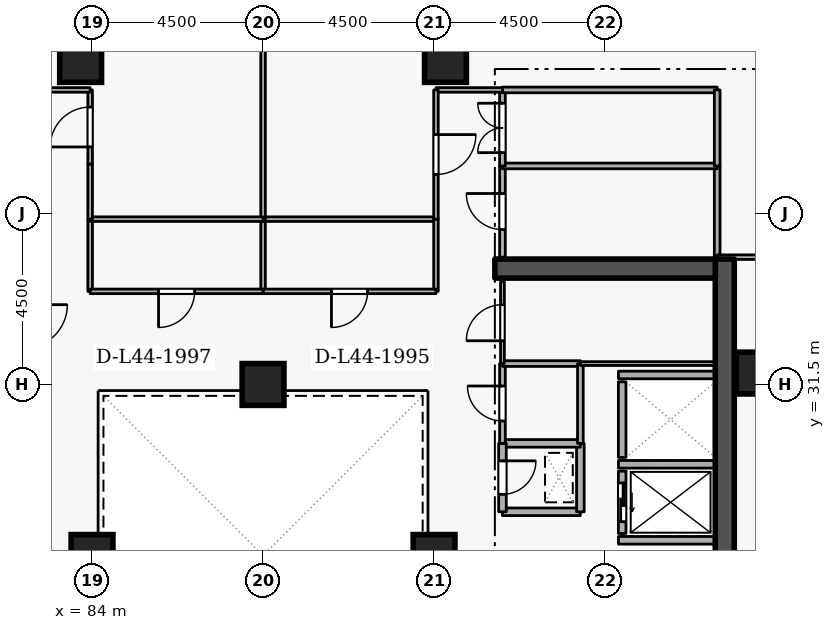
"""IFC4 building model, lengths in metres.
Left out: names, types, materials, properties, quantities, classifications, styles, units other than length and angle.
Written with IfcOpenShell. Run it as: python <this file> out.ifc"""

import sys

from ifc_helpers import new_model, si_unit, direction, frame, frame_2d, origin, origin_2d, place, context, subcontext, project, spatial, rectangle, extrude, element, fill, save


model = new_model("IFC4")
c1 = context("Model", 3, precision=1e-05, world=origin(), true_north=direction((0.0, 1.0)))
c2 = subcontext(c1, "Body", "Model", "MODEL_VIEW")
j1 = project(units=[si_unit("LENGTHUNIT", "METRE"), si_unit("PLANEANGLEUNIT", "RADIAN")], contexts=[c1])
p1 = place(None, origin())
s1 = spatial("IfcSite", under=j1, at=p1, CompositionType="ELEMENT")
p2 = place(p1, origin())
s2 = spatial("IfcBuilding", under=s1, at=p2, CompositionType="ELEMENT")
p3 = place(p2, frame((0.0, 0.0, 167.1)))
s3 = spatial("IfcBuildingStorey", under=s2, at=p3, CompositionType="ELEMENT", Elevation=167.1)
p4 = place(p3, frame((100.65, 19.2, 0.0), z_axis=(0.0, 0.0, 1.0), x_axis=(0.0, 1.0, 0.0)))
e1 = element("IfcWall", 1, at=p4, inside=s3, PredefinedType="SHEAR", context=c2, shape_type="SweptSolid", body=[
    extrude(rectangle(XDim=15.6, YDim=0.5, at=frame_2d((7.8, 0.0))), origin(), (0.0, 0.0, 1.0), 3.6),
])
p5 = place(p3, frame((94.6, 34.55, 0.0), z_axis=(0.0, 0.0, 1.0), x_axis=(1.0, 0.0, 0.0)))
e2 = element("IfcWall", 2, at=p5, inside=s3, PredefinedType="SHEAR", context=c2, shape_type="SweptSolid", body=[
    extrude(rectangle(XDim=5.8, YDim=0.5, at=frame_2d((2.9, 0.0))), origin(), (0.0, 0.0, 1.0), 3.6),
])
for number, where, z_axis, x_axis in (
    (3, (93.3, 40.0, 0.0), (0.0, 0.0, 1.0), (1.0, 0.0, 0.0)),
    (4, (83.7, 40.0, 0.0), (0.0, 0.0, 1.0), (1.0, 0.0, 0.0)),
    (5, (101.5, 31.8, 0.0), (0.0, 0.0, 1.0), (1.0, 0.0, 0.0)),
    (6, (93.0, 27.0, 0.0), (0.0, 0.0, 1.0), (1.0, 0.0, 0.0)),
    (7, (84.0, 27.0, 0.0), (0.0, 0.0, 1.0), (1.0, 0.0, 0.0)),
    (8, (88.5, 31.5, 0.0), (0.0, 0.0, 1.0), (1.0, 0.0, 0.0)),
):
    element("IfcColumn", number, at=place(p3, frame(where, z_axis=z_axis, x_axis=x_axis)), inside=s3, PredefinedType="COLUMN", context=c2, shape_type="SweptSolid", body=[
        extrude(rectangle(XDim=1.1, YDim=1.1, at=origin_2d()), origin(), (0.0, 0.0, 1.0), 3.6),
    ])
p6 = place(p3, frame((97.95, 29.22, 0.0), z_axis=(0.0, 0.0, 1.0), x_axis=(0.0, -1.0, 0.0)))
e9 = element("IfcWall", 9, at=p6, inside=s3, PredefinedType="STANDARD", context=c2, shape_type="SweptSolid", body=[
    extrude(rectangle(XDim=1.64, YDim=0.2, at=frame_2d((0.82, 0.0))), origin(), (0.0, 0.0, 1.0), 3.34),
])
p7 = place(p6, frame((0.31, 0.0, 0.0)))
e10 = element("IfcOpeningElement", 10, at=p7, cuts=e9, PredefinedType="OPENING", context=c2, shape_type="SweptSolid", body=[
    extrude(rectangle(XDim=1.02, YDim=2.06, at=frame_2d((0.51, 1.03))), frame((0.0, 0.11, 0.0), z_axis=(0.0, -1.0, 0.0), x_axis=(1.0, 0.0, 0.0)), (0.0, 0.0, 1.0), 0.22),
])
p8 = place(p3, frame((97.95, 31.57, 0.0), z_axis=(0.0, 0.0, 1.0), x_axis=(0.0, -1.0, 0.0)))
e11 = element("IfcWall", 11, at=p8, inside=s3, PredefinedType="STANDARD", context=c2, shape_type="SweptSolid", body=[
    extrude(rectangle(XDim=1.99, YDim=0.2, at=frame_2d((0.995, 0.0))), origin(), (0.0, 0.0, 1.0), 3.34),
])
for number, where, z_axis, x_axis in (
    (12, (97.852, 29.4, 0.0), (0.0, 0.0, 1.0), (1.0, 0.0, 0.0)),
    (13, (97.852, 27.4, 0.0), (0.0, 0.0, 1.0), (1.0, 0.0, 0.0)),
    (14, (97.852, 31.75, 0.0), (0.0, 0.0, 1.0), (1.0, 0.0, 0.0)),
):
    element("IfcWall", number, at=place(p3, frame(where, z_axis=z_axis, x_axis=x_axis)), inside=s3, PredefinedType="STANDARD", context=c2, shape_type="SweptSolid", body=[
        extrude(rectangle(XDim=2.536, YDim=0.2, at=frame_2d((1.268, 0.0))), origin(), (0.0, 0.0, 1.0), 3.34),
    ])
p9 = place(p3, frame((94.8, 28.15, 0.0), z_axis=(0.0, 0.0, 1.0), x_axis=(1.0, 0.0, 0.0)))
e15 = element("IfcWall", 15, at=p9, inside=s3, PredefinedType="STANDARD", context=c2, shape_type="SweptSolid", body=[
    extrude(rectangle(XDim=2.05, YDim=0.2, at=frame_2d((1.025, 0.0))), origin(), (0.0, 0.0, 1.0), 3.34),
])
p10 = place(p3, frame((96.85, 28.15, 0.0), z_axis=(0.0, 0.0, 1.0), x_axis=(0.0, 1.0, 0.0)))
e16 = element("IfcWall", 16, at=p10, inside=s3, PredefinedType="STANDARD", context=c2, shape_type="SweptSolid", body=[
    extrude(rectangle(XDim=1.8, YDim=0.2, at=frame_2d((0.9, 0.0))), origin(), (0.0, 0.0, 1.0), 3.34),
])
p11 = place(p3, frame((96.85, 29.95, 0.0), z_axis=(0.0, 0.0, 1.0), x_axis=(-1.0, 0.0, 0.0)))
e17 = element("IfcWall", 17, at=p11, inside=s3, PredefinedType="STANDARD", context=c2, shape_type="SweptSolid", body=[
    extrude(rectangle(XDim=2.05, YDim=0.2, at=frame_2d((1.025, 0.0))), origin(), (0.0, 0.0, 1.0), 3.34),
])
p12 = place(p3, frame((94.8, 29.95, 0.0), z_axis=(0.0, 0.0, 1.0), x_axis=(0.0, -1.0, 0.0)))
e18 = element("IfcWall", 18, at=p12, inside=s3, PredefinedType="STANDARD", context=c2, shape_type="SweptSolid", body=[
    extrude(rectangle(XDim=1.8, YDim=0.2, at=frame_2d((0.9, 0.0))), origin(), (0.0, 0.0, 1.0), 3.34),
])
p13 = place(p12, frame((0.46, 0.0, 0.0)))
e19 = element("IfcOpeningElement", 19, at=p13, cuts=e18, PredefinedType="OPENING", context=c2, shape_type="SweptSolid", body=[
    extrude(rectangle(XDim=0.88, YDim=2.04, at=frame_2d((0.44, 1.02))), frame((0.0, 0.11, 0.0), z_axis=(0.0, -1.0, 0.0), x_axis=(1.0, 0.0, 0.0)), (0.0, 0.0, 1.0), 0.22),
])
p14 = place(p3, frame((94.8, 29.95, 0.0), z_axis=(0.0, 0.0, 1.0), x_axis=(0.0, 1.0, 0.0)))
e20 = element("IfcWall", 20, at=p14, inside=s3, PredefinedType="PARTITIONING", context=c2, shape_type="SweptSolid", body=[
    extrude(rectangle(XDim=2.1, YDim=0.15, at=frame_2d((1.05, 0.0))), origin(), (0.0, 0.0, 1.0), 3.34),
])
p15 = place(p14, frame((0.59, 0.0, 0.0)))
e21 = element("IfcOpeningElement", 21, at=p15, cuts=e20, PredefinedType="OPENING", context=c2, shape_type="SweptSolid", body=[
    extrude(rectangle(XDim=0.92, YDim=2.08, at=frame_2d((0.46, 1.04))), frame((0.0, 0.085, 0.0), z_axis=(0.0, -1.0, 0.0), x_axis=(1.0, 0.0, 0.0)), (0.0, 0.0, 1.0), 0.17),
])
p16 = place(p3, frame((94.8, 32.05, 0.0), z_axis=(0.0, 0.0, 1.0), x_axis=(1.0, 0.0, 0.0)))
e22 = element("IfcWall", 22, at=p16, inside=s3, PredefinedType="PARTITIONING", context=c2, shape_type="SweptSolid", body=[
    extrude(rectangle(XDim=2.05, YDim=0.15, at=frame_2d((1.025, 0.0))), origin(), (0.0, 0.0, 1.0), 3.34),
])
p17 = place(p3, frame((96.85, 32.05, 0.0), z_axis=(0.0, 0.0, 1.0), x_axis=(0.0, -1.0, 0.0)))
e23 = element("IfcWall", 23, at=p17, inside=s3, PredefinedType="PARTITIONING", context=c2, shape_type="SweptSolid", body=[
    extrude(rectangle(XDim=2.1, YDim=0.15, at=frame_2d((1.05, 0.0))), origin(), (0.0, 0.0, 1.0), 3.34),
])
p18 = place(p3, frame((94.8, 32.05, 0.0), z_axis=(0.0, 0.0, 1.0), x_axis=(0.0, 1.0, 0.0)))
e24 = element("IfcWall", 24, at=p18, inside=s3, PredefinedType="PARTITIONING", context=c2, shape_type="SweptSolid", body=[
    extrude(rectangle(XDim=2.15, YDim=0.1, at=frame_2d((1.075, 0.0))), origin(), (0.0, 0.0, 1.0), 3.34),
])
p19 = place(p18, frame((0.6, 0.0, 0.0)))
e25 = element("IfcOpeningElement", 25, at=p19, cuts=e24, PredefinedType="OPENING", context=c2, shape_type="SweptSolid", body=[
    extrude(rectangle(XDim=0.95, YDim=2.1, at=frame_2d((0.475, 1.05))), frame((0.0, 0.06, 0.0), z_axis=(0.0, -1.0, 0.0), x_axis=(1.0, 0.0, 0.0)), (0.0, 0.0, 1.0), 0.12),
])
p20 = place(p3, frame((100.4, 32.05, 0.0), z_axis=(0.0, 0.0, 1.0), x_axis=(-1.0, 0.0, 0.0)))
e26 = element("IfcWall", 26, at=p20, inside=s3, PredefinedType="PARTITIONING", context=c2, shape_type="SweptSolid", body=[
    extrude(rectangle(XDim=3.55, YDim=0.1, at=frame_2d((1.775, 0.0))), origin(), (0.0, 0.0, 1.0), 3.34),
])
p21 = place(p3, frame((100.45, 37.25, 0.0), z_axis=(0.0, 0.0, 1.0), x_axis=(0.0, -1.0, 0.0)))
e27 = element("IfcWall", 27, at=p21, inside=s3, PredefinedType="PARTITIONING", context=c2, shape_type="SweptSolid", body=[
    extrude(rectangle(XDim=2.4, YDim=0.15, at=frame_2d((1.2, 0.0))), origin(), (0.0, 0.0, 1.0), 3.34),
])
p22 = place(p3, frame((94.8, 34.85, 0.0), z_axis=(0.0, 0.0, 1.0), x_axis=(0.0, 1.0, 0.0)))
e28 = element("IfcWall", 28, at=p22, inside=s3, PredefinedType="PARTITIONING", context=c2, shape_type="SweptSolid", body=[
    extrude(rectangle(XDim=2.4, YDim=0.15, at=frame_2d((1.2, 0.0))), origin(), (0.0, 0.0, 1.0), 3.34),
])
p23 = place(p22, frame((0.725, 0.0, 0.0)))
e29 = element("IfcOpeningElement", 29, at=p23, cuts=e28, PredefinedType="OPENING", context=c2, shape_type="SweptSolid", body=[
    extrude(rectangle(XDim=0.95, YDim=2.1, at=frame_2d((0.475, 1.05))), frame((0.0, 0.085, 0.0), z_axis=(0.0, -1.0, 0.0), x_axis=(1.0, 0.0, 0.0)), (0.0, 0.0, 1.0), 0.17),
])
p24 = place(p3, frame((94.8, 37.25, 0.0), z_axis=(0.0, 0.0, 1.0), x_axis=(1.0, 0.0, 0.0)))
e30 = element("IfcWall", 30, at=p24, inside=s3, PredefinedType="PARTITIONING", context=c2, shape_type="SweptSolid", body=[
    extrude(rectangle(XDim=5.65, YDim=0.15, at=frame_2d((2.825, 0.0))), origin(), (0.0, 0.0, 1.0), 3.34),
])
p25 = place(p3, frame((94.8, 37.25, 0.0), z_axis=(0.0, 0.0, 1.0), x_axis=(0.0, 1.0, 0.0)))
e31 = element("IfcWall", 31, at=p25, inside=s3, PredefinedType="PARTITIONING", context=c2, shape_type="SweptSolid", body=[
    extrude(rectangle(XDim=2.0, YDim=0.15, at=frame_2d((1.0, 0.0))), origin(), (0.0, 0.0, 1.0), 3.34),
])
p26 = place(p25, frame((0.35, 0.0, 0.0)))
e32 = element("IfcOpeningElement", 32, at=p26, cuts=e31, PredefinedType="OPENING", context=c2, shape_type="SweptSolid", body=[
    extrude(rectangle(XDim=1.3, YDim=2.12, at=frame_2d((0.65, 1.06))), frame((0.0, 0.085, 0.0), z_axis=(0.0, -1.0, 0.0), x_axis=(1.0, 0.0, 0.0)), (0.0, 0.0, 1.0), 0.17),
])
p27 = place(p3, frame((94.8, 39.25, 0.0), z_axis=(0.0, 0.0, 1.0), x_axis=(1.0, 0.0, 0.0)))
e33 = element("IfcWall", 33, at=p27, inside=s3, PredefinedType="PARTITIONING", context=c2, shape_type="SweptSolid", body=[
    extrude(rectangle(XDim=5.65, YDim=0.15, at=frame_2d((2.825, 0.0))), origin(), (0.0, 0.0, 1.0), 3.34),
])
p28 = place(p3, frame((100.45, 39.25, 0.0), z_axis=(0.0, 0.0, 1.0), x_axis=(0.0, -1.0, 0.0)))
e34 = element("IfcWall", 34, at=p28, inside=s3, PredefinedType="PARTITIONING", context=c2, shape_type="SweptSolid", body=[
    extrude(rectangle(XDim=2.0, YDim=0.15, at=frame_2d((1.0, 0.0))), origin(), (0.0, 0.0, 1.0), 3.34),
])
p29 = place(p3, frame((88.5, 33.95, 0.0), z_axis=(0.0, 0.0, 1.0), x_axis=(0.0, 1.0, 0.0)))
e35 = element("IfcWall", 35, at=p29, inside=s3, PredefinedType="PARTITIONING", context=c2, shape_type="SweptSolid", body=[
    extrude(rectangle(XDim=1.9, YDim=0.12, at=frame_2d((0.95, 0.0))), origin(), (0.0, 0.0, 1.0), 3.34),
])
p30 = place(p3, frame((88.5, 35.85, 0.0), z_axis=(0.0, 0.0, 1.0), x_axis=(1.0, 0.0, 0.0)))
e36 = element("IfcWall", 36, at=p30, inside=s3, PredefinedType="PARTITIONING", context=c2, shape_type="SweptSolid", body=[
    extrude(rectangle(XDim=4.55, YDim=0.12, at=frame_2d((2.275, 0.0))), origin(), (0.0, 0.0, 1.0), 3.34),
])
p31 = place(p3, frame((93.05, 35.85, 0.0), z_axis=(0.0, 0.0, 1.0), x_axis=(0.0, -1.0, 0.0)))
e37 = element("IfcWall", 37, at=p31, inside=s3, PredefinedType="PARTITIONING", context=c2, shape_type="SweptSolid", body=[
    extrude(rectangle(XDim=1.9, YDim=0.12, at=frame_2d((0.95, 0.0))), origin(), (0.0, 0.0, 1.0), 3.34),
])
p32 = place(p3, frame((93.05, 33.95, 0.0), z_axis=(0.0, 0.0, 1.0), x_axis=(-1.0, 0.0, 0.0)))
e38 = element("IfcWall", 38, at=p32, inside=s3, PredefinedType="PARTITIONING", context=c2, shape_type="SweptSolid", body=[
    extrude(rectangle(XDim=4.55, YDim=0.12, at=frame_2d((2.275, 0.0))), origin(), (0.0, 0.0, 1.0), 3.34),
])
p33 = place(p32, frame((1.8, 0.0, 0.0)))
e39 = element("IfcOpeningElement", 39, at=p33, cuts=e38, PredefinedType="OPENING", context=c2, shape_type="SweptSolid", body=[
    extrude(rectangle(XDim=0.95, YDim=2.1, at=frame_2d((0.475, 1.05))), frame((0.0, 0.07, 0.0), z_axis=(0.0, -1.0, 0.0), x_axis=(1.0, 0.0, 0.0)), (0.0, 0.0, 1.0), 0.14),
])
p34 = place(p3, frame((94.8, 39.25, 0.0), z_axis=(0.0, 0.0, 1.0), x_axis=(-1.0, 0.0, 0.0)))
e40 = element("IfcWall", 40, at=p34, inside=s3, PredefinedType="PARTITIONING", context=c2, shape_type="SweptSolid", body=[
    extrude(rectangle(XDim=1.75, YDim=0.12, at=frame_2d((0.875, 0.0))), origin(), (0.0, 0.0, 1.0), 3.34),
])
p35 = place(p3, frame((93.05, 39.25, 0.0), z_axis=(0.0, 0.0, 1.0), x_axis=(0.0, -1.0, 0.0)))
e41 = element("IfcWall", 41, at=p35, inside=s3, PredefinedType="PARTITIONING", context=c2, shape_type="SweptSolid", body=[
    extrude(rectangle(XDim=3.4, YDim=0.12, at=frame_2d((1.7, 0.0))), origin(), (0.0, 0.0, 1.0), 3.34),
])
p36 = place(p35, frame((1.175, 0.0, 0.0)))
e42 = element("IfcOpeningElement", 42, at=p36, cuts=e41, PredefinedType="OPENING", context=c2, shape_type="SweptSolid", body=[
    extrude(rectangle(XDim=1.05, YDim=2.1, at=frame_2d((0.525, 1.05))), frame((0.0, 0.07, 0.0), z_axis=(0.0, -1.0, 0.0), x_axis=(1.0, 0.0, 0.0)), (0.0, 0.0, 1.0), 0.14),
])
p37 = place(p3, frame((88.5, 35.85, 0.0), z_axis=(0.0, 0.0, 1.0), x_axis=(0.0, 1.0, 0.0)))
e43 = element("IfcWall", 43, at=p37, inside=s3, PredefinedType="PARTITIONING", context=c2, shape_type="SweptSolid", body=[
    extrude(rectangle(XDim=8.45, YDim=0.12, at=frame_2d((4.225, 0.0))), origin(), (0.0, 0.0, 1.0), 2.882),
])
p38 = place(p3, frame((112.22, 34.85, 0.0), z_axis=(0.0, 0.0, 1.0), x_axis=(-1.0, 0.0, 0.0)))
e44 = element("IfcWall", 44, at=p38, inside=s3, PredefinedType="PARTITIONING", context=c2, shape_type="SweptSolid", body=[
    extrude(rectangle(XDim=11.77, YDim=0.12, at=frame_2d((5.885, 0.0))), origin(), (0.0, 0.0, 1.0), 2.545),
])
p39 = place(p3, frame((83.95, 33.95, 0.0), z_axis=(0.0, 0.0, 1.0), x_axis=(0.0, 1.0, 0.0)))
e45 = element("IfcWall", 45, at=p39, inside=s3, PredefinedType="PARTITIONING", context=c2, shape_type="SweptSolid", body=[
    extrude(rectangle(XDim=1.9, YDim=0.12, at=frame_2d((0.95, 0.0))), origin(), (0.0, 0.0, 1.0), 3.34),
])
p40 = place(p3, frame((83.95, 35.85, 0.0), z_axis=(0.0, 0.0, 1.0), x_axis=(1.0, 0.0, 0.0)))
e46 = element("IfcWall", 46, at=p40, inside=s3, PredefinedType="PARTITIONING", context=c2, shape_type="SweptSolid", body=[
    extrude(rectangle(XDim=4.55, YDim=0.12, at=frame_2d((2.275, 0.0))), origin(), (0.0, 0.0, 1.0), 3.34),
])
p41 = place(p3, frame((88.5, 33.95, 0.0), z_axis=(0.0, 0.0, 1.0), x_axis=(-1.0, 0.0, 0.0)))
e47 = element("IfcWall", 47, at=p41, inside=s3, PredefinedType="PARTITIONING", context=c2, shape_type="SweptSolid", body=[
    extrude(rectangle(XDim=4.55, YDim=0.12, at=frame_2d((2.275, 0.0))), origin(), (0.0, 0.0, 1.0), 3.34),
])
p42 = place(p41, frame((1.8, 0.0, 0.0)))
e48 = element("IfcOpeningElement", 48, at=p42, cuts=e47, PredefinedType="OPENING", context=c2, shape_type="SweptSolid", body=[
    extrude(rectangle(XDim=0.95, YDim=2.1, at=frame_2d((0.475, 1.05))), frame((0.0, 0.07, 0.0), z_axis=(0.0, -1.0, 0.0), x_axis=(1.0, 0.0, 0.0)), (0.0, 0.0, 1.0), 0.14),
])
p43 = place(p3, frame((83.95, 35.85, 0.0), z_axis=(0.0, 0.0, 1.0), x_axis=(0.0, 1.0, 0.0)))
e49 = element("IfcWall", 49, at=p43, inside=s3, PredefinedType="PARTITIONING", context=c2, shape_type="SweptSolid", body=[
    extrude(rectangle(XDim=1.45, YDim=0.12, at=frame_2d((0.725, 0.0))), origin(), (0.0, 0.0, 1.0), 3.34),
])
p44 = place(p3, frame((83.95, 37.3, 0.0), z_axis=(0.0, 0.0, 1.0), x_axis=(0.0, 1.0, 0.0)))
e50 = element("IfcWall", 50, at=p44, inside=s3, PredefinedType="PARTITIONING", context=c2, shape_type="SweptSolid", body=[
    extrude(rectangle(XDim=1.95, YDim=0.12, at=frame_2d((0.975, 0.0))), origin(), (0.0, 0.0, 1.0), 3.34),
])
p45 = place(p44, frame((0.45, 0.0, 0.0)))
e51 = element("IfcOpeningElement", 51, at=p45, cuts=e50, PredefinedType="OPENING", context=c2, shape_type="SweptSolid", body=[
    extrude(rectangle(XDim=1.05, YDim=2.1, at=frame_2d((0.525, 1.05))), frame((0.0, 0.07, 0.0), z_axis=(0.0, -1.0, 0.0), x_axis=(1.0, 0.0, 0.0)), (0.0, 0.0, 1.0), 0.14),
])
p46 = place(p3, frame((83.95, 39.25, 0.0), z_axis=(0.0, 0.0, 1.0), x_axis=(-1.0, 0.0, 0.0)))
e52 = element("IfcWall", 52, at=p46, inside=s3, PredefinedType="PARTITIONING", context=c2, shape_type="SweptSolid", body=[
    extrude(rectangle(XDim=1.75, YDim=0.12, at=frame_2d((0.875, 0.0))), origin(), (0.0, 0.0, 1.0), 3.34),
])
p47 = place(p7, origin())
e53 = element("IfcDoor", 53, at=p47, inside=s3, OperationType="SLIDING_TO_LEFT", PredefinedType="DOOR", context=c2, shape_type="SweptSolid", body=[
    extrude(rectangle(XDim=1.02, YDim=2.06, at=frame_2d((0.51, 1.03))), frame((0.0, 0.025, 0.0), z_axis=(0.0, -1.0, 0.0), x_axis=(1.0, 0.0, 0.0)), (0.0, 0.0, 1.0), 0.05),
])
fill(e10, e53)
p48 = place(p13, origin())
e54 = element("IfcDoor", 54, at=p48, inside=s3, OperationType="SINGLE_SWING_LEFT", PredefinedType="DOOR", context=c2, shape_type="SweptSolid", body=[
    extrude(rectangle(XDim=0.88, YDim=2.04, at=frame_2d((0.44, 1.02))), frame((0.0, 0.025, 0.0), z_axis=(0.0, -1.0, 0.0), x_axis=(1.0, 0.0, 0.0)), (0.0, 0.0, 1.0), 0.05),
])
fill(e19, e54)
p49 = place(p15, origin())
e55 = element("IfcDoor", 55, at=p49, inside=s3, OperationType="SINGLE_SWING_RIGHT", PredefinedType="DOOR", context=c2, shape_type="SweptSolid", body=[
    extrude(rectangle(XDim=0.92, YDim=2.08, at=frame_2d((0.46, 1.04))), frame((0.0, 0.025, 0.0), z_axis=(0.0, -1.0, 0.0), x_axis=(1.0, 0.0, 0.0)), (0.0, 0.0, 1.0), 0.05),
])
fill(e21, e55)
p50 = place(p19, origin())
e56 = element("IfcDoor", 56, at=p50, inside=s3, OperationType="SINGLE_SWING_LEFT", PredefinedType="DOOR", context=c2, shape_type="SweptSolid", body=[
    extrude(rectangle(XDim=0.95, YDim=2.1, at=frame_2d((0.475, 1.05))), frame((0.0, 0.025, 0.0), z_axis=(0.0, -1.0, 0.0), x_axis=(1.0, 0.0, 0.0)), (0.0, 0.0, 1.0), 0.05),
])
fill(e25, e56)
p51 = place(p23, origin())
e57 = element("IfcDoor", 57, at=p51, inside=s3, OperationType="SINGLE_SWING_RIGHT", PredefinedType="DOOR", context=c2, shape_type="SweptSolid", body=[
    extrude(rectangle(XDim=0.95, YDim=2.1, at=frame_2d((0.475, 1.05))), frame((0.0, 0.025, 0.0), z_axis=(0.0, -1.0, 0.0), x_axis=(1.0, 0.0, 0.0)), (0.0, 0.0, 1.0), 0.05),
])
fill(e29, e57)
p52 = place(p26, origin())
e58 = element("IfcDoor", 58, at=p52, inside=s3, OperationType="DOUBLE_DOOR_SINGLE_SWING", PredefinedType="DOOR", context=c2, shape_type="SweptSolid", body=[
    extrude(rectangle(XDim=1.3, YDim=2.12, at=frame_2d((0.65, 1.06))), frame((0.0, 0.025, 0.0), z_axis=(0.0, -1.0, 0.0), x_axis=(1.0, 0.0, 0.0)), (0.0, 0.0, 1.0), 0.05),
])
fill(e32, e58)
p53 = place(p33, origin())
e59 = element("IfcDoor", 59, at=p53, inside=s3, OperationType="SINGLE_SWING_RIGHT", PredefinedType="DOOR", context=c2, shape_type="SweptSolid", body=[
    extrude(rectangle(XDim=0.95, YDim=2.1, at=frame_2d((0.475, 1.05))), frame((0.0, 0.025, 0.0), z_axis=(0.0, -1.0, 0.0), x_axis=(1.0, 0.0, 0.0)), (0.0, 0.0, 1.0), 0.05),
])
fill(e39, e59)
p54 = place(p36, origin())
e60 = element("IfcDoor", 60, at=p54, inside=s3, OperationType="SINGLE_SWING_LEFT", PredefinedType="DOOR", context=c2, shape_type="SweptSolid", body=[
    extrude(rectangle(XDim=1.05, YDim=2.1, at=frame_2d((0.525, 1.05))), frame((0.0, 0.025, 0.0), z_axis=(0.0, -1.0, 0.0), x_axis=(1.0, 0.0, 0.0)), (0.0, 0.0, 1.0), 0.05),
])
fill(e42, e60)
p55 = place(p42, origin())
e61 = element("IfcDoor", 61, at=p55, inside=s3, OperationType="SINGLE_SWING_RIGHT", PredefinedType="DOOR", context=c2, shape_type="SweptSolid", body=[
    extrude(rectangle(XDim=0.95, YDim=2.1, at=frame_2d((0.475, 1.05))), frame((0.0, 0.025, 0.0), z_axis=(0.0, -1.0, 0.0), x_axis=(1.0, 0.0, 0.0)), (0.0, 0.0, 1.0), 0.05),
])
fill(e48, e61)
p56 = place(p45, origin())
e62 = element("IfcDoor", 62, at=p56, inside=s3, OperationType="SINGLE_SWING_LEFT", PredefinedType="DOOR", context=c2, shape_type="SweptSolid", body=[
    extrude(rectangle(XDim=1.05, YDim=2.1, at=frame_2d((0.525, 1.05))), frame((0.0, 0.025, 0.0), z_axis=(0.0, -1.0, 0.0), x_axis=(1.0, 0.0, 0.0)), (0.0, 0.0, 1.0), 0.05),
])
fill(e51, e62)
save(model, sys.argv[1])
